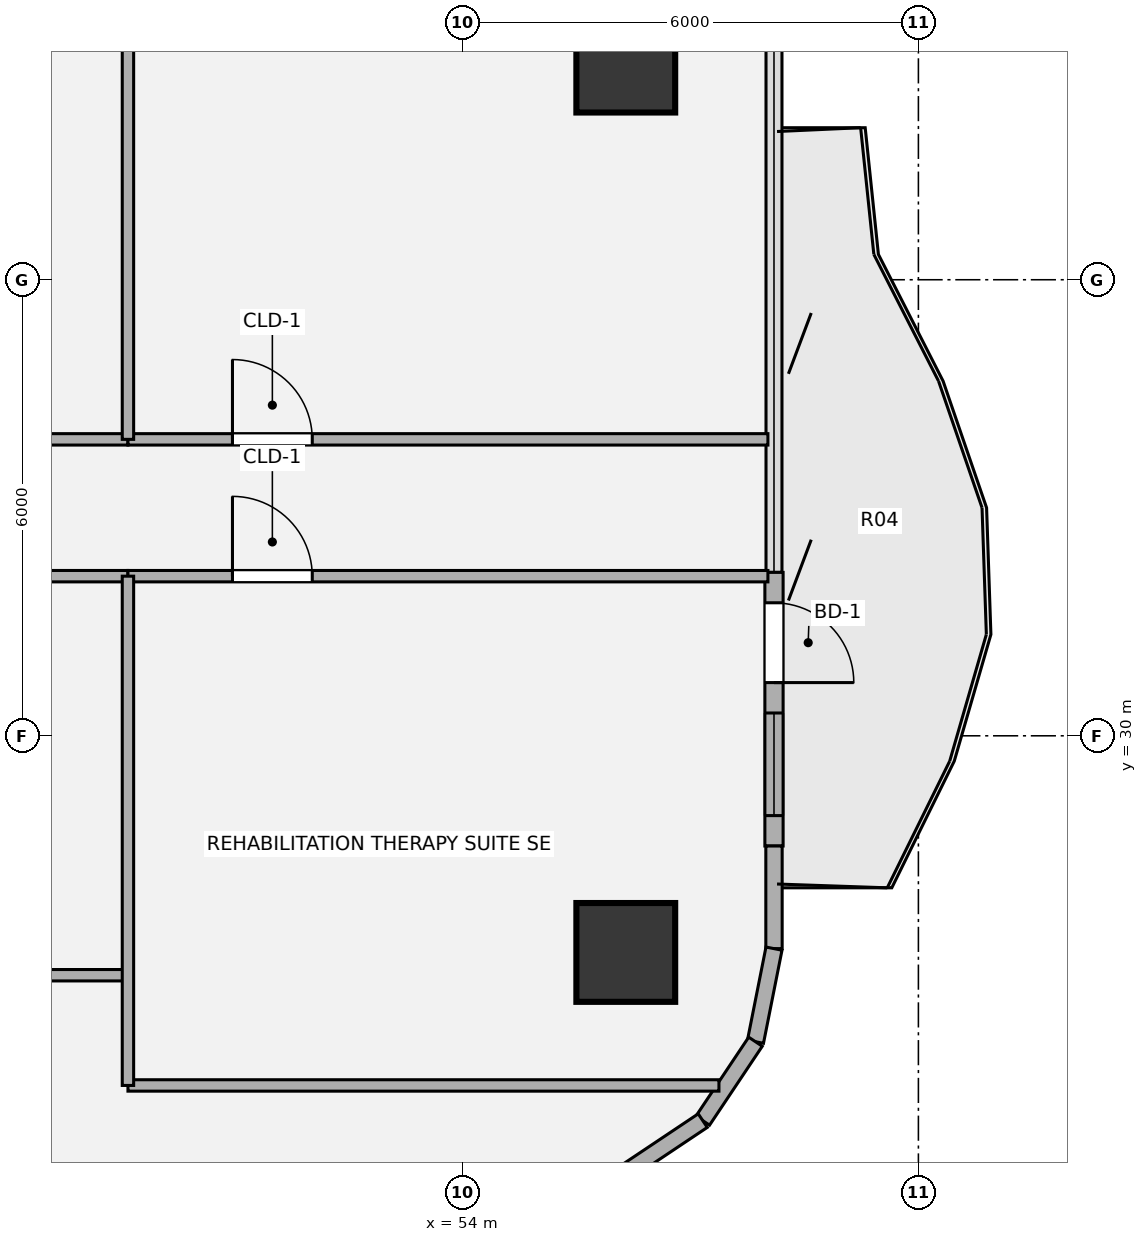
"""IFC4 building model, lengths in metres.
Left out: names, types, materials, properties, quantities, classifications, styles, units other than length and angle.
Written with IfcOpenShell. Run it as: python <this file> out.ifc"""

import sys

from ifc_helpers import new_model, si_unit, direction, frame, frame_2d, origin, origin_2d, place, context, subcontext, project, spatial, rectangle, hollow_circle, extrude, source, transform, mapped, element, fill, save


model = new_model("IFC4")
c1 = context("Model", 3, precision=1e-05, world=origin(), true_north=direction((0.0, 1.0)))
c2 = subcontext(c1, "Body", "Model", "MODEL_VIEW")
j1 = project(units=[si_unit("LENGTHUNIT", "METRE"), si_unit("PLANEANGLEUNIT", "RADIAN")], contexts=[c1])
p1 = place(None, origin())
s1 = spatial("IfcSite", under=j1, at=p1, CompositionType="ELEMENT")
p2 = place(p1, origin())
s2 = spatial("IfcBuilding", under=s1, at=p2, CompositionType="ELEMENT")
p3 = place(p2, frame((0.0, 0.0, 116.28)))
s3 = spatial("IfcBuildingStorey", under=s2, at=p3, CompositionType="ELEMENT", Elevation=116.28)
m1 = source(origin(), c2, "Body", "SweptSolid", [
    extrude(hollow_circle(Radius=0.65, WallThickness=0.045, at=origin_2d()), origin(), (0.0, 0.0, 1.0), 3.78),
])
for number, where, z_axis, x_axis in (
    (1, (56.15, 27.15, 0.0), (0.0, 0.0, 1.0), (1.0, 0.0, 0.0)),
    (2, (56.15, 38.85, 0.0), (0.0, 0.0, 1.0), (1.0, 0.0, 0.0)),
):
    element("IfcColumn", number, at=place(p3, frame(where, z_axis=z_axis, x_axis=x_axis)), inside=s3, PredefinedType="COLUMN", context=c2, shape_type="MappedRepresentation", body=[
        mapped(m1, transform((0.0, 0.0, 0.0), x_axis=(1.0, 0.0, 0.0), y_axis=(0.0, 1.0, 0.0), z_axis=(0.0, 0.0, 1.0), scale=1.0)),
    ])
p4 = place(p3, frame((58.1, 32.15, 0.0), z_axis=(0.0, 0.0, 1.0), x_axis=(0.0, -1.0, 0.0)))
e3 = element("IfcWall", 3, at=p4, inside=s3, PredefinedType="SOLIDWALL", context=c2, shape_type="SweptSolid", body=[
    extrude(rectangle(XDim=3.6, YDim=0.24, at=frame_2d((1.8, 0.0))), origin(), (0.0, 0.0, 1.0), 3.53),
])
p5 = place(p4, frame((0.4, 0.0, 0.0)))
e4 = element("IfcOpeningElement", 4, at=p5, cuts=e3, PredefinedType="OPENING", context=c2, shape_type="SweptSolid", body=[
    extrude(rectangle(XDim=1.05, YDim=2.15, at=origin_2d()), frame((0.525, 0.13, 1.075), z_axis=(0.0, -1.0, 0.0), x_axis=(1.0, 0.0, 0.0)), (0.0, 0.0, 1.0), 0.26),
])
p6 = place(p4, frame((1.85, 0.0, 0.85)))
e5 = element("IfcOpeningElement", 5, at=p6, cuts=e3, PredefinedType="OPENING", context=c2, shape_type="SweptSolid", body=[
    extrude(rectangle(XDim=1.35, YDim=1.35, at=origin_2d()), frame((0.675, 0.13, 0.675), z_axis=(0.0, -1.0, 0.0), x_axis=(1.0, 0.0, 0.0)), (0.0, 0.0, 1.0), 0.26),
])
p7 = place(p3, frame((58.1, 28.55, 0.0), z_axis=(0.0, 0.0, 1.0), x_axis=(0.0, -1.0, 0.0)))
e6 = element("IfcWall", 6, at=p7, inside=s3, PredefinedType="SOLIDWALL", context=c2, shape_type="SweptSolid", body=[
    extrude(rectangle(XDim=1.35, YDim=0.215, at=frame_2d((0.675, 0.0))), origin(), (0.0, 0.0, 1.0), 3.53),
])
for number, where, z_axis, x_axis in (
    (7, (58.1, 27.2, 0.0), (0.0, 0.0, 1.0), (-0.195, -0.981, 0.0)),
    (8, (57.856, 25.975, 0.0), (0.0, 0.0, 1.0), (-0.556, -0.831, 0.0)),
    (9, (57.163, 24.937, 0.0), (0.0, 0.0, 1.0), (-0.831, -0.556, 0.0)),
):
    element("IfcWall", number, at=place(p3, frame(where, z_axis=z_axis, x_axis=x_axis)), inside=s3, PredefinedType="SOLIDWALL", context=c2, shape_type="SweptSolid", body=[
        extrude(rectangle(XDim=1.249, YDim=0.215, at=frame_2d((0.624, 0.0))), origin(), (0.0, 0.0, 1.0), 3.53),
    ])
p8 = place(p3, frame((49.6, 25.4, 0.0), z_axis=(0.0, 0.0, 1.0), x_axis=(1.0, 0.0, 0.0)))
e10 = element("IfcWall", 10, at=p8, inside=s3, PredefinedType="PARTITIONING", context=c2, shape_type="SweptSolid", body=[
    extrude(rectangle(XDim=7.776, YDim=0.15, at=frame_2d((3.888, 0.0))), origin(), (0.0, 0.0, 1.0), 3.5),
])
p9 = place(p3, frame((43.5, 26.85, 0.0), z_axis=(0.0, 0.0, 1.0), x_axis=(1.0, 0.0, 0.0)))
e11 = element("IfcWall", 11, at=p9, inside=s3, PredefinedType="PARTITIONING", context=c2, shape_type="SweptSolid", body=[
    extrude(rectangle(XDim=6.1, YDim=0.15, at=frame_2d((3.05, 0.0))), origin(), (0.0, 0.0, 1.0), 3.055),
])
p10 = place(p3, frame((43.5, 32.1, 0.0), z_axis=(0.0, 0.0, 1.0), x_axis=(1.0, 0.0, 0.0)))
e12 = element("IfcWall", 12, at=p10, inside=s3, PredefinedType="PARTITIONING", context=c2, shape_type="SweptSolid", body=[
    extrude(rectangle(XDim=6.1, YDim=0.15, at=frame_2d((3.05, 0.0))), origin(), (0.0, 0.0, 1.0), 2.982),
])
p11 = place(p10, frame((2.525, 0.0, 0.0)))
e13 = element("IfcOpeningElement", 13, at=p11, cuts=e12, PredefinedType="OPENING", context=c2, shape_type="SweptSolid", body=[
    extrude(rectangle(XDim=1.05, YDim=2.1, at=origin_2d()), frame((0.525, 0.085, 1.05), z_axis=(0.0, -1.0, 0.0), x_axis=(1.0, 0.0, 0.0)), (0.0, 0.0, 1.0), 0.17),
])
p12 = place(p3, frame((49.6, 32.1, 0.0), z_axis=(0.0, 0.0, 1.0), x_axis=(1.0, 0.0, 0.0)))
e14 = element("IfcWall", 14, at=p12, inside=s3, PredefinedType="PARTITIONING", context=c2, shape_type="SweptSolid", body=[
    extrude(rectangle(XDim=8.42, YDim=0.15, at=frame_2d((4.21, 0.0))), origin(), (0.0, 0.0, 1.0), 2.982),
])
p13 = place(p12, frame((1.375, 0.0, 0.0)))
e15 = element("IfcOpeningElement", 15, at=p13, cuts=e14, PredefinedType="OPENING", context=c2, shape_type="SweptSolid", body=[
    extrude(rectangle(XDim=1.05, YDim=2.1, at=origin_2d()), frame((0.525, 0.085, 1.05), z_axis=(0.0, -1.0, 0.0), x_axis=(1.0, 0.0, 0.0)), (0.0, 0.0, 1.0), 0.17),
])
p14 = place(p3, frame((43.5, 33.9, 0.0), z_axis=(0.0, 0.0, 1.0), x_axis=(1.0, 0.0, 0.0)))
e16 = element("IfcWall", 16, at=p14, inside=s3, PredefinedType="PARTITIONING", context=c2, shape_type="SweptSolid", body=[
    extrude(rectangle(XDim=6.1, YDim=0.15, at=frame_2d((3.05, 0.0))), origin(), (0.0, 0.0, 1.0), 2.982),
])
p15 = place(p14, frame((2.525, 0.0, 0.0)))
e17 = element("IfcOpeningElement", 17, at=p15, cuts=e16, PredefinedType="OPENING", context=c2, shape_type="SweptSolid", body=[
    extrude(rectangle(XDim=1.05, YDim=2.1, at=origin_2d()), frame((0.525, 0.085, 1.05), z_axis=(0.0, -1.0, 0.0), x_axis=(1.0, 0.0, 0.0)), (0.0, 0.0, 1.0), 0.17),
])
p16 = place(p3, frame((49.6, 33.9, 0.0), z_axis=(0.0, 0.0, 1.0), x_axis=(1.0, 0.0, 0.0)))
e18 = element("IfcWall", 18, at=p16, inside=s3, PredefinedType="PARTITIONING", context=c2, shape_type="SweptSolid", body=[
    extrude(rectangle(XDim=8.42, YDim=0.15, at=frame_2d((4.21, 0.0))), origin(), (0.0, 0.0, 1.0), 2.982),
])
p17 = place(p16, frame((1.375, 0.0, 0.0)))
e19 = element("IfcOpeningElement", 19, at=p17, cuts=e18, PredefinedType="OPENING", context=c2, shape_type="SweptSolid", body=[
    extrude(rectangle(XDim=1.05, YDim=2.1, at=origin_2d()), frame((0.525, 0.085, 1.05), z_axis=(0.0, -1.0, 0.0), x_axis=(1.0, 0.0, 0.0)), (0.0, 0.0, 1.0), 0.17),
])
p18 = place(p3, frame((49.6, 25.4, 0.0), z_axis=(0.0, 0.0, 1.0), x_axis=(0.0, 1.0, 0.0)))
e20 = element("IfcWall", 20, at=p18, inside=s3, PredefinedType="PARTITIONING", context=c2, shape_type="SweptSolid", body=[
    extrude(rectangle(XDim=6.7, YDim=0.15, at=frame_2d((3.35, 0.0))), origin(), (0.0, 0.0, 1.0), 3.5),
])
p19 = place(p3, frame((49.6, 33.9, 0.0), z_axis=(0.0, 0.0, 1.0), x_axis=(0.0, 1.0, 0.0)))
e21 = element("IfcWall", 21, at=p19, inside=s3, PredefinedType="PARTITIONING", context=c2, shape_type="SweptSolid", body=[
    extrude(rectangle(XDim=13.421, YDim=0.15, at=frame_2d((6.71, 0.0))), origin(), (0.0, 0.0, 1.0), 3.5),
])
m2 = source(origin(), c2, "Body", "SweptSolid", [
    extrude(rectangle(XDim=1.05, YDim=2.15, at=origin_2d()), frame((0.525, 0.025, 1.075), z_axis=(0.0, -1.0, 0.0), x_axis=(1.0, 0.0, 0.0)), (0.0, 0.0, 1.0), 0.05),
])
p20 = place(p5, origin())
e22 = element("IfcDoor", 22, at=p20, inside=s3, OperationType="SINGLE_SWING_RIGHT", PredefinedType="DOOR", context=c2, shape_type="MappedRepresentation", body=[
    mapped(m2, transform((0.0, 0.0, 0.0), x_axis=(1.0, 0.0, 0.0), y_axis=(0.0, 1.0, 0.0), z_axis=(0.0, 0.0, 1.0), scale=1.0)),
])
fill(e4, e22)
m3 = source(origin(), c2, "Body", "SweptSolid", [
    extrude(rectangle(XDim=1.35, YDim=1.35, at=origin_2d()), frame((0.675, 0.03, 0.675), z_axis=(0.0, -1.0, 0.0), x_axis=(1.0, 0.0, 0.0)), (0.0, 0.0, 1.0), 0.06),
])
p21 = place(p6, origin())
e23 = element("IfcWindow", 23, at=p21, inside=s3, PartitioningType="SINGLE_PANEL", PredefinedType="WINDOW", context=c2, shape_type="MappedRepresentation", body=[
    mapped(m3, transform((0.0, 0.0, 0.0), x_axis=(1.0, 0.0, 0.0), y_axis=(0.0, 1.0, 0.0), z_axis=(0.0, 0.0, 1.0), scale=1.0)),
])
fill(e5, e23)
m4 = source(origin(), c2, "Body", "SweptSolid", [
    extrude(rectangle(XDim=1.05, YDim=2.1, at=origin_2d()), frame((0.525, 0.025, 1.05), z_axis=(0.0, -1.0, 0.0), x_axis=(1.0, 0.0, 0.0)), (0.0, 0.0, 1.0), 0.05),
])
p22 = place(p13, origin())
e24 = element("IfcDoor", 24, at=p22, inside=s3, OperationType="SINGLE_SWING_LEFT", PredefinedType="DOOR", context=c2, shape_type="MappedRepresentation", body=[
    mapped(m4, transform((0.0, 0.0, 0.0), x_axis=(1.0, 0.0, 0.0), y_axis=(0.0, 1.0, 0.0), z_axis=(0.0, 0.0, 1.0), scale=1.0)),
])
fill(e15, e24)
p23 = place(p17, origin())
e25 = element("IfcDoor", 25, at=p23, inside=s3, OperationType="SINGLE_SWING_LEFT", PredefinedType="DOOR", context=c2, shape_type="MappedRepresentation", body=[
    mapped(m4, transform((0.0, 0.0, 0.0), x_axis=(1.0, 0.0, 0.0), y_axis=(0.0, 1.0, 0.0), z_axis=(0.0, 0.0, 1.0), scale=1.0)),
])
fill(e19, e25)
save(model, sys.argv[1])
